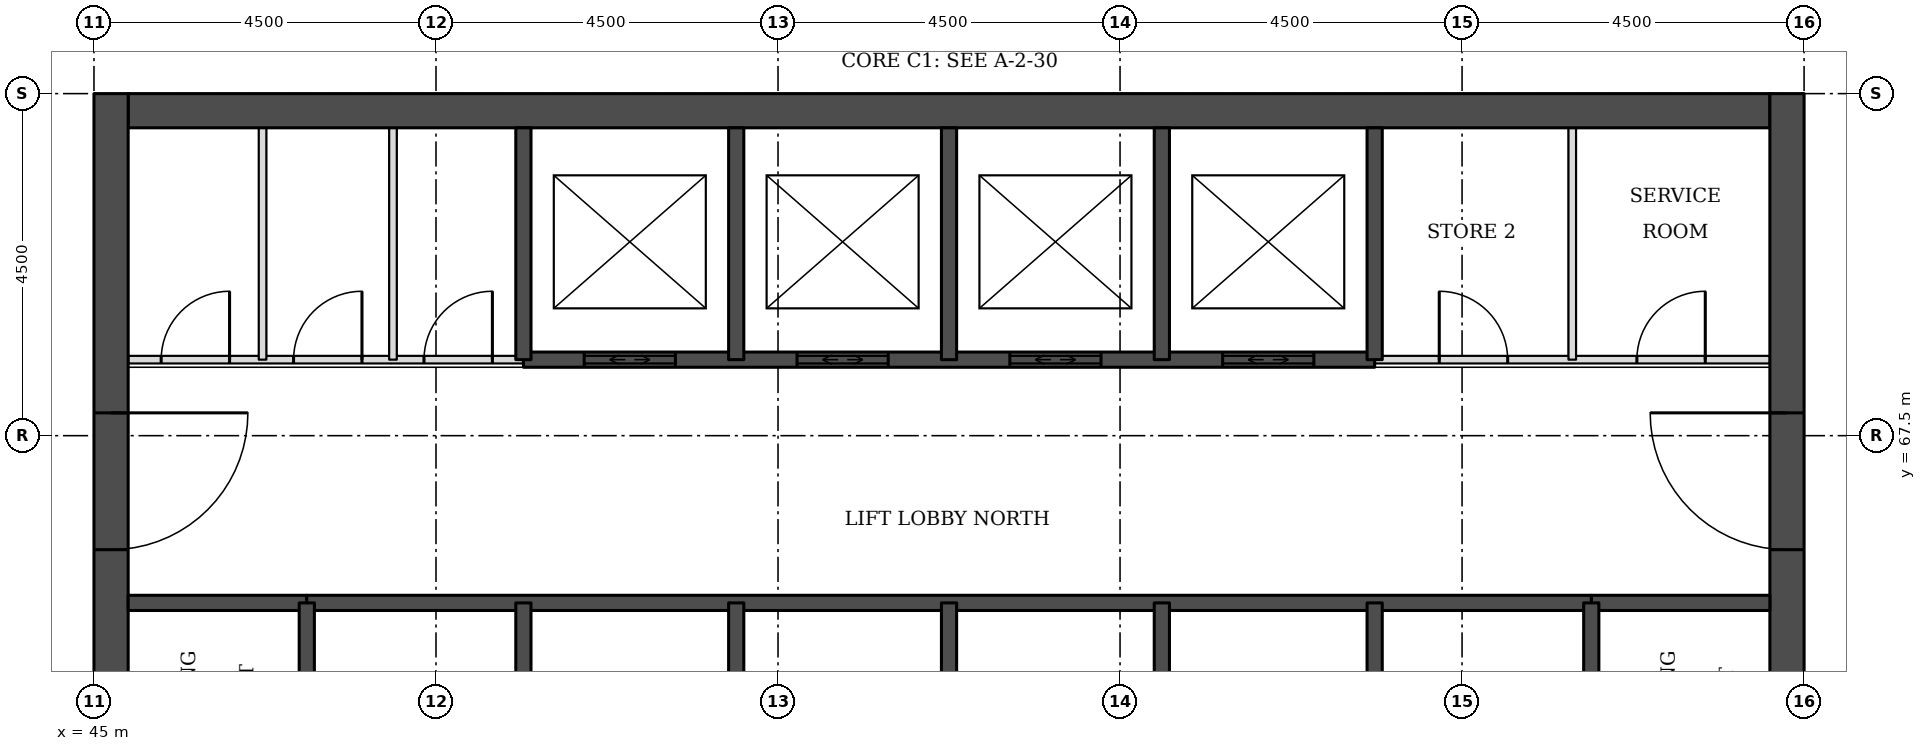
"""IFC4 building model, lengths in metres.
Left out: names, types, materials, properties, quantities, classifications, styles, units other than length and angle.
Written with IfcOpenShell. Run it as: python <this file> out.ifc"""

import sys

from ifc_helpers import new_model, si_unit, direction, frame, frame_2d, origin, place, context, subcontext, project, spatial, rectangle, extrude, element, fill, save


model = new_model("IFC4")
c1 = context("Model", 3, precision=1e-05, world=origin(), true_north=direction((0.0, 1.0)))
c2 = subcontext(c1, "Body", "Model", "MODEL_VIEW")
j1 = project(units=[si_unit("LENGTHUNIT", "METRE"), si_unit("PLANEANGLEUNIT", "RADIAN")], contexts=[c1])
p1 = place(None, origin())
s1 = spatial("IfcSite", under=j1, at=p1, CompositionType="ELEMENT")
p2 = place(p1, origin())
s2 = spatial("IfcBuilding", under=s1, at=p2, CompositionType="ELEMENT")
p3 = place(p2, frame((0.0, 0.0, 112.2)))
s3 = spatial("IfcBuildingStorey", under=s2, at=p3, CompositionType="ELEMENT", Elevation=112.2)
p4 = place(p3, frame((45.45, 71.775, 0.0), z_axis=(0.0, 0.0, 1.0), x_axis=(1.0, 0.0, 0.0)))
e1 = element("IfcWall", 1, at=p4, inside=s3, PredefinedType="SHEAR", context=c2, shape_type="SweptSolid", body=[
    extrude(rectangle(XDim=21.6, YDim=0.45, at=frame_2d((10.8, 0.0))), origin(), (0.0, 0.0, 1.0), 3.7),
])
p5 = place(p3, frame((45.225, 49.5, 0.0), z_axis=(0.0, 0.0, 1.0), x_axis=(0.0, 1.0, 0.0)))
e2 = element("IfcWall", 2, at=p5, inside=s3, PredefinedType="SHEAR", context=c2, shape_type="SweptSolid", body=[
    extrude(rectangle(XDim=22.5, YDim=0.45, at=frame_2d((11.25, 0.0))), origin(), (0.0, 0.0, 1.0), 3.7),
])
p6 = place(p5, frame((4.2, 0.0, 0.0)))
e3 = element("IfcOpeningElement", 3, at=p6, cuts=e2, PredefinedType="OPENING", context=c2, shape_type="SweptSolid", body=[
    extrude(rectangle(XDim=1.8, YDim=2.1, at=frame_2d((0.9, 1.05))), frame((0.0, 0.235, 0.0), z_axis=(0.0, -1.0, 0.0), x_axis=(1.0, 0.0, 0.0)), (0.0, 0.0, 1.0), 0.47),
])
p7 = place(p5, frame((6.9, 0.0, 0.0)))
e4 = element("IfcOpeningElement", 4, at=p7, cuts=e2, PredefinedType="OPENING", context=c2, shape_type="SweptSolid", body=[
    extrude(rectangle(XDim=1.1, YDim=2.1, at=frame_2d((0.55, 1.05))), frame((0.0, 0.235, 0.0), z_axis=(0.0, -1.0, 0.0), x_axis=(1.0, 0.0, 0.0)), (0.0, 0.0, 1.0), 0.47),
])
p8 = place(p5, frame((13.6, 0.0, 0.0)))
e5 = element("IfcOpeningElement", 5, at=p8, cuts=e2, PredefinedType="OPENING", context=c2, shape_type="SweptSolid", body=[
    extrude(rectangle(XDim=1.1, YDim=2.1, at=frame_2d((0.55, 1.05))), frame((0.0, 0.235, 0.0), z_axis=(0.0, -1.0, 0.0), x_axis=(1.0, 0.0, 0.0)), (0.0, 0.0, 1.0), 0.47),
])
p9 = place(p5, frame((16.5, 0.0, 0.0)))
e6 = element("IfcOpeningElement", 6, at=p9, cuts=e2, PredefinedType="OPENING", context=c2, shape_type="SweptSolid", body=[
    extrude(rectangle(XDim=1.8, YDim=2.1, at=frame_2d((0.9, 1.05))), frame((0.0, 0.235, 0.0), z_axis=(0.0, -1.0, 0.0), x_axis=(1.0, 0.0, 0.0)), (0.0, 0.0, 1.0), 0.47),
])
p10 = place(p3, frame((67.275, 49.5, 0.0), z_axis=(0.0, 0.0, 1.0), x_axis=(0.0, 1.0, 0.0)))
e7 = element("IfcWall", 7, at=p10, inside=s3, PredefinedType="SHEAR", context=c2, shape_type="SweptSolid", body=[
    extrude(rectangle(XDim=22.5, YDim=0.45, at=frame_2d((11.25, 0.0))), origin(), (0.0, 0.0, 1.0), 3.7),
])
p11 = place(p10, frame((4.2, 0.0, 0.0)))
e8 = element("IfcOpeningElement", 8, at=p11, cuts=e7, PredefinedType="OPENING", context=c2, shape_type="SweptSolid", body=[
    extrude(rectangle(XDim=1.8, YDim=2.1, at=frame_2d((0.9, 1.05))), frame((0.0, 0.235, 0.0), z_axis=(0.0, -1.0, 0.0), x_axis=(1.0, 0.0, 0.0)), (0.0, 0.0, 1.0), 0.47),
])
p12 = place(p10, frame((6.9, 0.0, 0.0)))
e9 = element("IfcOpeningElement", 9, at=p12, cuts=e7, PredefinedType="OPENING", context=c2, shape_type="SweptSolid", body=[
    extrude(rectangle(XDim=1.1, YDim=2.1, at=frame_2d((0.55, 1.05))), frame((0.0, 0.235, 0.0), z_axis=(0.0, -1.0, 0.0), x_axis=(1.0, 0.0, 0.0)), (0.0, 0.0, 1.0), 0.47),
])
p13 = place(p10, frame((13.6, 0.0, 0.0)))
e10 = element("IfcOpeningElement", 10, at=p13, cuts=e7, PredefinedType="OPENING", context=c2, shape_type="SweptSolid", body=[
    extrude(rectangle(XDim=1.1, YDim=2.1, at=frame_2d((0.55, 1.05))), frame((0.0, 0.235, 0.0), z_axis=(0.0, -1.0, 0.0), x_axis=(1.0, 0.0, 0.0)), (0.0, 0.0, 1.0), 0.47),
])
p14 = place(p10, frame((16.5, 0.0, 0.0)))
e11 = element("IfcOpeningElement", 11, at=p14, cuts=e7, PredefinedType="OPENING", context=c2, shape_type="SweptSolid", body=[
    extrude(rectangle(XDim=1.8, YDim=2.1, at=frame_2d((0.9, 1.05))), frame((0.0, 0.235, 0.0), z_axis=(0.0, -1.0, 0.0), x_axis=(1.0, 0.0, 0.0)), (0.0, 0.0, 1.0), 0.47),
])
for number, where, z_axis, x_axis in (
    (12, (45.45, 65.3, 0.0), (0.0, 0.0, 1.0), (1.0, 0.0, 0.0)),
    (13, (64.7, 65.3, 0.0), (0.0, 0.0, 1.0), (1.0, 0.0, 0.0)),
):
    element("IfcWall", number, at=place(p3, frame(where, z_axis=z_axis, x_axis=x_axis)), inside=s3, PredefinedType="SOLIDWALL", context=c2, shape_type="SweptSolid", body=[
        extrude(rectangle(XDim=2.35, YDim=0.2, at=frame_2d((1.175, 0.0))), origin(), (0.0, 0.0, 1.0), 3.55),
    ])
p15 = place(p3, frame((47.8, 65.3, 0.0), z_axis=(0.0, 0.0, 1.0), x_axis=(1.0, 0.0, 0.0)))
e14 = element("IfcWall", 14, at=p15, inside=s3, PredefinedType="SOLIDWALL", context=c2, shape_type="SweptSolid", body=[
    extrude(rectangle(XDim=16.9, YDim=0.2, at=frame_2d((8.45, 0.0))), origin(), (0.0, 0.0, 1.0), 3.55),
])
p16 = place(p3, frame((45.45, 68.5, 0.0), z_axis=(0.0, 0.0, 1.0), x_axis=(1.0, 0.0, 0.0)))
e15 = element("IfcWall", 15, at=p16, inside=s3, PredefinedType="PARTITIONING", context=c2, shape_type="SweptSolid", body=[
    extrude(rectangle(XDim=5.2, YDim=0.1, at=frame_2d((2.6, 0.0))), origin(), (0.0, 0.0, 1.0), 3.55),
])
p17 = place(p16, frame((0.434, 0.0, 0.0)))
e16 = element("IfcOpeningElement", 16, at=p17, cuts=e15, PredefinedType="OPENING", context=c2, shape_type="SweptSolid", body=[
    extrude(rectangle(XDim=0.9, YDim=2.1, at=frame_2d((0.45, 1.05))), frame((0.0, 0.06, 0.0), z_axis=(0.0, -1.0, 0.0), x_axis=(1.0, 0.0, 0.0)), (0.0, 0.0, 1.0), 0.12),
])
p18 = place(p16, frame((2.176, 0.0, 0.0)))
e17 = element("IfcOpeningElement", 17, at=p18, cuts=e15, PredefinedType="OPENING", context=c2, shape_type="SweptSolid", body=[
    extrude(rectangle(XDim=0.9, YDim=2.1, at=frame_2d((0.45, 1.05))), frame((0.0, 0.06, 0.0), z_axis=(0.0, -1.0, 0.0), x_axis=(1.0, 0.0, 0.0)), (0.0, 0.0, 1.0), 0.12),
])
p19 = place(p16, frame((3.892, 0.0, 0.0)))
e18 = element("IfcOpeningElement", 18, at=p19, cuts=e15, PredefinedType="OPENING", context=c2, shape_type="SweptSolid", body=[
    extrude(rectangle(XDim=0.9, YDim=2.1, at=frame_2d((0.45, 1.05))), frame((0.0, 0.06, 0.0), z_axis=(0.0, -1.0, 0.0), x_axis=(1.0, 0.0, 0.0)), (0.0, 0.0, 1.0), 0.12),
])
p20 = place(p3, frame((61.85, 68.5, 0.0), z_axis=(0.0, 0.0, 1.0), x_axis=(1.0, 0.0, 0.0)))
e19 = element("IfcWall", 19, at=p20, inside=s3, PredefinedType="PARTITIONING", context=c2, shape_type="SweptSolid", body=[
    extrude(rectangle(XDim=5.2, YDim=0.1, at=frame_2d((2.6, 0.0))), origin(), (0.0, 0.0, 1.0), 3.55),
])
p21 = place(p20, frame((3.45, 0.0, 0.0)))
e20 = element("IfcOpeningElement", 20, at=p21, cuts=e19, PredefinedType="OPENING", context=c2, shape_type="SweptSolid", body=[
    extrude(rectangle(XDim=0.9, YDim=2.1, at=frame_2d((0.45, 1.05))), frame((0.0, 0.06, 0.0), z_axis=(0.0, -1.0, 0.0), x_axis=(1.0, 0.0, 0.0)), (0.0, 0.0, 1.0), 0.12),
])
p22 = place(p20, frame((0.85, 0.0, 0.0)))
e21 = element("IfcOpeningElement", 21, at=p22, cuts=e19, PredefinedType="OPENING", context=c2, shape_type="SweptSolid", body=[
    extrude(rectangle(XDim=0.9, YDim=2.1, at=frame_2d((0.45, 1.05))), frame((0.0, 0.06, 0.0), z_axis=(0.0, -1.0, 0.0), x_axis=(1.0, 0.0, 0.0)), (0.0, 0.0, 1.0), 0.12),
])
p23 = place(p3, frame((50.65, 68.5, 0.0), z_axis=(0.0, 0.0, 1.0), x_axis=(1.0, 0.0, 0.0)))
e22 = element("IfcWall", 22, at=p23, inside=s3, PredefinedType="SOLIDWALL", context=c2, shape_type="SweptSolid", body=[
    extrude(rectangle(XDim=11.2, YDim=0.2, at=frame_2d((5.6, 0.0))), origin(), (0.0, 0.0, 1.0), 3.55),
])
p24 = place(p23, frame((0.8, 0.0, 0.0)))
e23 = element("IfcOpeningElement", 23, at=p24, cuts=e22, PredefinedType="OPENING", context=c2, shape_type="SweptSolid", body=[
    extrude(rectangle(XDim=1.2, YDim=2.1, at=frame_2d((0.6, 1.05))), frame((0.0, 0.11, 0.0), z_axis=(0.0, -1.0, 0.0), x_axis=(1.0, 0.0, 0.0)), (0.0, 0.0, 1.0), 0.22),
])
p25 = place(p23, frame((3.6, 0.0, 0.0)))
e24 = element("IfcOpeningElement", 24, at=p25, cuts=e22, PredefinedType="OPENING", context=c2, shape_type="SweptSolid", body=[
    extrude(rectangle(XDim=1.2, YDim=2.1, at=frame_2d((0.6, 1.05))), frame((0.0, 0.11, 0.0), z_axis=(0.0, -1.0, 0.0), x_axis=(1.0, 0.0, 0.0)), (0.0, 0.0, 1.0), 0.22),
])
p26 = place(p23, frame((6.4, 0.0, 0.0)))
e25 = element("IfcOpeningElement", 25, at=p26, cuts=e22, PredefinedType="OPENING", context=c2, shape_type="SweptSolid", body=[
    extrude(rectangle(XDim=1.2, YDim=2.1, at=frame_2d((0.6, 1.05))), frame((0.0, 0.11, 0.0), z_axis=(0.0, -1.0, 0.0), x_axis=(1.0, 0.0, 0.0)), (0.0, 0.0, 1.0), 0.22),
])
p27 = place(p23, frame((9.2, 0.0, 0.0)))
e26 = element("IfcOpeningElement", 26, at=p27, cuts=e22, PredefinedType="OPENING", context=c2, shape_type="SweptSolid", body=[
    extrude(rectangle(XDim=1.2, YDim=2.1, at=frame_2d((0.6, 1.05))), frame((0.0, 0.11, 0.0), z_axis=(0.0, -1.0, 0.0), x_axis=(1.0, 0.0, 0.0)), (0.0, 0.0, 1.0), 0.22),
])
p28 = place(p3, frame((47.218, 68.5, 0.0), z_axis=(0.0, 0.0, 1.0), x_axis=(0.0, 1.0, 0.0)))
e27 = element("IfcWall", 27, at=p28, inside=s3, PredefinedType="PARTITIONING", context=c2, shape_type="SweptSolid", body=[
    extrude(rectangle(XDim=3.05, YDim=0.1, at=frame_2d((1.525, 0.0))), origin(), (0.0, 0.0, 1.0), 3.55),
])
p29 = place(p3, frame((47.8, 62.0, 0.0), z_axis=(0.0, 0.0, 1.0), x_axis=(0.0, 1.0, 0.0)))
e28 = element("IfcWall", 28, at=p29, inside=s3, PredefinedType="SOLIDWALL", context=c2, shape_type="SweptSolid", body=[
    extrude(rectangle(XDim=3.3, YDim=0.2, at=frame_2d((1.65, 0.0))), origin(), (0.0, 0.0, 1.0), 3.55),
])
p30 = place(p29, frame((1.1, 0.0, 0.0)))
e29 = element("IfcOpeningElement", 29, at=p30, cuts=e28, PredefinedType="OPENING", context=c2, shape_type="SweptSolid", body=[
    extrude(rectangle(XDim=1.1, YDim=2.1, at=frame_2d((0.55, 1.05))), frame((0.0, 0.11, 0.0), z_axis=(0.0, -1.0, 0.0), x_axis=(1.0, 0.0, 0.0)), (0.0, 0.0, 1.0), 0.22),
])
p31 = place(p3, frame((48.934, 68.5, 0.0), z_axis=(0.0, 0.0, 1.0), x_axis=(0.0, 1.0, 0.0)))
e30 = element("IfcWall", 30, at=p31, inside=s3, PredefinedType="PARTITIONING", context=c2, shape_type="SweptSolid", body=[
    extrude(rectangle(XDim=3.05, YDim=0.1, at=frame_2d((1.525, 0.0))), origin(), (0.0, 0.0, 1.0), 3.55),
])
p32 = place(p3, frame((50.65, 62.0, 0.0), z_axis=(0.0, 0.0, 1.0), x_axis=(0.0, 1.0, 0.0)))
e31 = element("IfcWall", 31, at=p32, inside=s3, PredefinedType="SOLIDWALL", context=c2, shape_type="SweptSolid", body=[
    extrude(rectangle(XDim=3.3, YDim=0.2, at=frame_2d((1.65, 0.0))), origin(), (0.0, 0.0, 1.0), 3.55),
])
p33 = place(p3, frame((50.65, 68.5, 0.0), z_axis=(0.0, 0.0, 1.0), x_axis=(0.0, 1.0, 0.0)))
e32 = element("IfcWall", 32, at=p33, inside=s3, PredefinedType="SOLIDWALL", context=c2, shape_type="SweptSolid", body=[
    extrude(rectangle(XDim=3.05, YDim=0.2, at=frame_2d((1.525, 0.0))), origin(), (0.0, 0.0, 1.0), 3.55),
])
p34 = place(p3, frame((53.45, 62.5, 0.0), z_axis=(0.0, 0.0, 1.0), x_axis=(0.0, 1.0, 0.0)))
e33 = element("IfcWall", 33, at=p34, inside=s3, PredefinedType="SOLIDWALL", context=c2, shape_type="SweptSolid", body=[
    extrude(rectangle(XDim=2.8, YDim=0.2, at=frame_2d((1.4, 0.0))), origin(), (0.0, 0.0, 1.0), 3.55),
])
p35 = place(p3, frame((53.45, 68.5, 0.0), z_axis=(0.0, 0.0, 1.0), x_axis=(0.0, 1.0, 0.0)))
e34 = element("IfcWall", 34, at=p35, inside=s3, PredefinedType="SOLIDWALL", context=c2, shape_type="SweptSolid", body=[
    extrude(rectangle(XDim=3.05, YDim=0.2, at=frame_2d((1.525, 0.0))), origin(), (0.0, 0.0, 1.0), 3.55),
])
p36 = place(p3, frame((56.25, 62.5, 0.0), z_axis=(0.0, 0.0, 1.0), x_axis=(0.0, 1.0, 0.0)))
e35 = element("IfcWall", 35, at=p36, inside=s3, PredefinedType="SOLIDWALL", context=c2, shape_type="SweptSolid", body=[
    extrude(rectangle(XDim=2.8, YDim=0.2, at=frame_2d((1.4, 0.0))), origin(), (0.0, 0.0, 1.0), 3.55),
])
p37 = place(p3, frame((56.25, 68.5, 0.0), z_axis=(0.0, 0.0, 1.0), x_axis=(0.0, 1.0, 0.0)))
e36 = element("IfcWall", 36, at=p37, inside=s3, PredefinedType="SOLIDWALL", context=c2, shape_type="SweptSolid", body=[
    extrude(rectangle(XDim=3.05, YDim=0.2, at=frame_2d((1.525, 0.0))), origin(), (0.0, 0.0, 1.0), 3.55),
])
p38 = place(p3, frame((59.05, 62.5, 0.0), z_axis=(0.0, 0.0, 1.0), x_axis=(0.0, 1.0, 0.0)))
e37 = element("IfcWall", 37, at=p38, inside=s3, PredefinedType="SOLIDWALL", context=c2, shape_type="SweptSolid", body=[
    extrude(rectangle(XDim=2.8, YDim=0.2, at=frame_2d((1.4, 0.0))), origin(), (0.0, 0.0, 1.0), 3.55),
])
p39 = place(p3, frame((59.05, 68.5, 0.0), z_axis=(0.0, 0.0, 1.0), x_axis=(0.0, 1.0, 0.0)))
e38 = element("IfcWall", 38, at=p39, inside=s3, PredefinedType="SOLIDWALL", context=c2, shape_type="SweptSolid", body=[
    extrude(rectangle(XDim=3.05, YDim=0.2, at=frame_2d((1.525, 0.0))), origin(), (0.0, 0.0, 1.0), 3.55),
])
p40 = place(p3, frame((61.85, 62.0, 0.0), z_axis=(0.0, 0.0, 1.0), x_axis=(0.0, 1.0, 0.0)))
e39 = element("IfcWall", 39, at=p40, inside=s3, PredefinedType="SOLIDWALL", context=c2, shape_type="SweptSolid", body=[
    extrude(rectangle(XDim=3.3, YDim=0.2, at=frame_2d((1.65, 0.0))), origin(), (0.0, 0.0, 1.0), 3.55),
])
p41 = place(p3, frame((61.85, 68.5, 0.0), z_axis=(0.0, 0.0, 1.0), x_axis=(0.0, 1.0, 0.0)))
e40 = element("IfcWall", 40, at=p41, inside=s3, PredefinedType="SOLIDWALL", context=c2, shape_type="SweptSolid", body=[
    extrude(rectangle(XDim=3.05, YDim=0.2, at=frame_2d((1.525, 0.0))), origin(), (0.0, 0.0, 1.0), 3.55),
])
p42 = place(p3, frame((64.45, 68.5, 0.0), z_axis=(0.0, 0.0, 1.0), x_axis=(0.0, 1.0, 0.0)))
e41 = element("IfcWall", 41, at=p42, inside=s3, PredefinedType="PARTITIONING", context=c2, shape_type="SweptSolid", body=[
    extrude(rectangle(XDim=3.05, YDim=0.1, at=frame_2d((1.525, 0.0))), origin(), (0.0, 0.0, 1.0), 3.55),
])
p43 = place(p3, frame((64.7, 62.0, 0.0), z_axis=(0.0, 0.0, 1.0), x_axis=(0.0, 1.0, 0.0)))
e42 = element("IfcWall", 42, at=p43, inside=s3, PredefinedType="SOLIDWALL", context=c2, shape_type="SweptSolid", body=[
    extrude(rectangle(XDim=3.3, YDim=0.2, at=frame_2d((1.65, 0.0))), origin(), (0.0, 0.0, 1.0), 3.55),
])
p44 = place(p43, frame((1.1, 0.0, 0.0)))
e43 = element("IfcOpeningElement", 43, at=p44, cuts=e42, PredefinedType="OPENING", context=c2, shape_type="SweptSolid", body=[
    extrude(rectangle(XDim=1.1, YDim=2.1, at=frame_2d((0.55, 1.05))), frame((0.0, 0.11, 0.0), z_axis=(0.0, -1.0, 0.0), x_axis=(1.0, 0.0, 0.0)), (0.0, 0.0, 1.0), 0.22),
])
p45 = place(p24, origin())
e44 = element("IfcDoor", 44, at=p45, inside=s3, OperationType="DOUBLE_DOOR_SLIDING", PredefinedType="DOOR", context=c2, shape_type="SweptSolid", body=[
    extrude(rectangle(XDim=1.2, YDim=2.1, at=frame_2d((0.6, 1.05))), frame((0.0, 0.025, 0.0), z_axis=(0.0, -1.0, 0.0), x_axis=(1.0, 0.0, 0.0)), (0.0, 0.0, 1.0), 0.05),
])
fill(e23, e44)
p46 = place(p25, origin())
e45 = element("IfcDoor", 45, at=p46, inside=s3, OperationType="DOUBLE_DOOR_SLIDING", PredefinedType="DOOR", context=c2, shape_type="SweptSolid", body=[
    extrude(rectangle(XDim=1.2, YDim=2.1, at=frame_2d((0.6, 1.05))), frame((0.0, 0.025, 0.0), z_axis=(0.0, -1.0, 0.0), x_axis=(1.0, 0.0, 0.0)), (0.0, 0.0, 1.0), 0.05),
])
fill(e24, e45)
p47 = place(p26, origin())
e46 = element("IfcDoor", 46, at=p47, inside=s3, OperationType="DOUBLE_DOOR_SLIDING", PredefinedType="DOOR", context=c2, shape_type="SweptSolid", body=[
    extrude(rectangle(XDim=1.2, YDim=2.1, at=frame_2d((0.6, 1.05))), frame((0.0, 0.025, 0.0), z_axis=(0.0, -1.0, 0.0), x_axis=(1.0, 0.0, 0.0)), (0.0, 0.0, 1.0), 0.05),
])
fill(e25, e46)
p48 = place(p27, origin())
e47 = element("IfcDoor", 47, at=p48, inside=s3, OperationType="DOUBLE_DOOR_SLIDING", PredefinedType="DOOR", context=c2, shape_type="SweptSolid", body=[
    extrude(rectangle(XDim=1.2, YDim=2.1, at=frame_2d((0.6, 1.05))), frame((0.0, 0.025, 0.0), z_axis=(0.0, -1.0, 0.0), x_axis=(1.0, 0.0, 0.0)), (0.0, 0.0, 1.0), 0.05),
])
fill(e26, e47)
p49 = place(p9, frame((1.8, 0.0, 0.0), z_axis=(0.0, 0.0, 1.0), x_axis=(-1.0, 0.0, 0.0)))
e48 = element("IfcDoor", 48, at=p49, inside=s3, OperationType="SINGLE_SWING_LEFT", PredefinedType="DOOR", context=c2, shape_type="SweptSolid", body=[
    extrude(rectangle(XDim=1.8, YDim=2.1, at=frame_2d((0.9, 1.05))), frame((0.0, 0.025, 0.0), z_axis=(0.0, -1.0, 0.0), x_axis=(1.0, 0.0, 0.0)), (0.0, 0.0, 1.0), 0.05),
])
fill(e6, e48)
p50 = place(p14, origin())
e49 = element("IfcDoor", 49, at=p50, inside=s3, OperationType="SINGLE_SWING_RIGHT", PredefinedType="DOOR", context=c2, shape_type="SweptSolid", body=[
    extrude(rectangle(XDim=1.8, YDim=2.1, at=frame_2d((0.9, 1.05))), frame((0.0, 0.025, 0.0), z_axis=(0.0, -1.0, 0.0), x_axis=(1.0, 0.0, 0.0)), (0.0, 0.0, 1.0), 0.05),
])
fill(e11, e49)
p51 = place(p21, origin())
e50 = element("IfcDoor", 50, at=p51, inside=s3, OperationType="SINGLE_SWING_RIGHT", PredefinedType="DOOR", context=c2, shape_type="SweptSolid", body=[
    extrude(rectangle(XDim=0.9, YDim=2.1, at=frame_2d((0.45, 1.05))), frame((0.0, 0.025, 0.0), z_axis=(0.0, -1.0, 0.0), x_axis=(1.0, 0.0, 0.0)), (0.0, 0.0, 1.0), 0.05),
])
fill(e20, e50)
p52 = place(p22, origin())
e51 = element("IfcDoor", 51, at=p52, inside=s3, OperationType="SINGLE_SWING_LEFT", PredefinedType="DOOR", context=c2, shape_type="SweptSolid", body=[
    extrude(rectangle(XDim=0.9, YDim=2.1, at=frame_2d((0.45, 1.05))), frame((0.0, 0.025, 0.0), z_axis=(0.0, -1.0, 0.0), x_axis=(1.0, 0.0, 0.0)), (0.0, 0.0, 1.0), 0.05),
])
fill(e21, e51)
p53 = place(p17, origin())
e52 = element("IfcDoor", 52, at=p53, inside=s3, OperationType="SINGLE_SWING_RIGHT", PredefinedType="DOOR", context=c2, shape_type="SweptSolid", body=[
    extrude(rectangle(XDim=0.9, YDim=2.1, at=frame_2d((0.45, 1.05))), frame((0.0, 0.025, 0.0), z_axis=(0.0, -1.0, 0.0), x_axis=(1.0, 0.0, 0.0)), (0.0, 0.0, 1.0), 0.05),
])
fill(e16, e52)
p54 = place(p18, origin())
e53 = element("IfcDoor", 53, at=p54, inside=s3, OperationType="SINGLE_SWING_RIGHT", PredefinedType="DOOR", context=c2, shape_type="SweptSolid", body=[
    extrude(rectangle(XDim=0.9, YDim=2.1, at=frame_2d((0.45, 1.05))), frame((0.0, 0.025, 0.0), z_axis=(0.0, -1.0, 0.0), x_axis=(1.0, 0.0, 0.0)), (0.0, 0.0, 1.0), 0.05),
])
fill(e17, e53)
p55 = place(p19, origin())
e54 = element("IfcDoor", 54, at=p55, inside=s3, OperationType="SINGLE_SWING_RIGHT", PredefinedType="DOOR", context=c2, shape_type="SweptSolid", body=[
    extrude(rectangle(XDim=0.9, YDim=2.1, at=frame_2d((0.45, 1.05))), frame((0.0, 0.025, 0.0), z_axis=(0.0, -1.0, 0.0), x_axis=(1.0, 0.0, 0.0)), (0.0, 0.0, 1.0), 0.05),
])
fill(e18, e54)
save(model, sys.argv[1])
